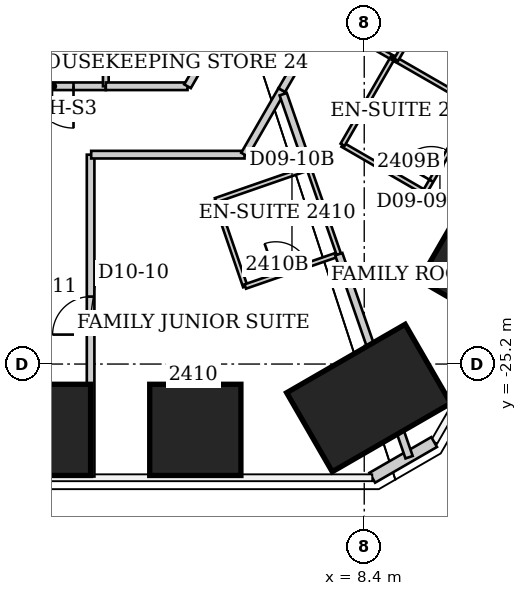
"""IFC4 building model, lengths in metres.
Left out: names, types, materials, properties, quantities, classifications, styles, units other than length and angle.
Written with IfcOpenShell. Run it as: python <this file> out.ifc"""

import sys

from ifc_helpers import new_model, si_unit, direction, frame, frame_2d, origin, origin_2d, place, context, subcontext, project, spatial, rectangle, extrude, element, fill, save


model = new_model("IFC4")
c1 = context("Model", 3, precision=1e-05, world=origin(), true_north=direction((0.0, 1.0)))
c2 = subcontext(c1, "Body", "Model", "MODEL_VIEW")
j1 = project(units=[si_unit("LENGTHUNIT", "METRE"), si_unit("PLANEANGLEUNIT", "RADIAN")], contexts=[c1])
p1 = place(None, origin())
s1 = spatial("IfcSite", under=j1, at=p1, CompositionType="ELEMENT")
p2 = place(p1, origin())
s2 = spatial("IfcBuilding", under=s1, at=p2, CompositionType="ELEMENT")
p3 = place(p2, frame((0.0, 0.0, 100.6)))
s3 = spatial("IfcBuildingStorey", under=s2, at=p3, CompositionType="ELEMENT", Elevation=100.6)
p4 = place(p3, frame((11.494, -22.559, 0.0), z_axis=(0.0, 0.0, 1.0), x_axis=(0.866025403784, -0.5, 0.0)))
e1 = element("IfcColumn", 1, at=p4, inside=s3, PredefinedType="COLUMN", context=c2, shape_type="SweptSolid", body=[
    extrude(rectangle(XDim=2.4, YDim=2.4, at=origin_2d()), origin(), (0.0, 0.0, 1.0), 3.8),
])
p5 = place(p3, frame((8.518, -26.094, 0.0), z_axis=(0.0, 0.0, 1.0), x_axis=(0.5, -0.866025403784, 0.0)))
e2 = element("IfcColumn", 2, at=p5, inside=s3, PredefinedType="COLUMN", context=c2, shape_type="SweptSolid", body=[
    extrude(rectangle(XDim=2.4, YDim=3.6, at=origin_2d()), origin(), (0.0, 0.0, 1.0), 3.8),
])
for number, where, z_axis, x_axis in (
    (3, (3.955, -26.932, 0.0), (0.0, 0.0, 1.0), (0.0, -1.0, 0.0)),
    (4, (0.0, -26.932, 0.0), (0.0, 0.0, 1.0), (0.0, -1.0, 0.0)),
):
    element("IfcColumn", number, at=place(p3, frame(where, z_axis=z_axis, x_axis=x_axis)), inside=s3, PredefinedType="COLUMN", context=c2, shape_type="SweptSolid", body=[
        extrude(rectangle(XDim=2.4, YDim=2.4, at=origin_2d()), origin(), (0.0, 0.0, 1.0), 3.8),
    ])
p6 = place(p3, frame((10.24, -27.252, 0.0), z_axis=(0.0, 0.0, 1.0), x_axis=(-0.866045024864, -0.499966013754, 0.0)))
e5 = element("IfcWall", 5, at=p6, inside=s3, PredefinedType="SOLIDWALL", context=c2, shape_type="SweptSolid", body=[
    extrude(rectangle(XDim=1.88, YDim=0.3, at=frame_2d((0.94, 0.0))), origin(), (0.0, 0.0, 1.0), 3.64),
])
p7 = place(p3, frame((1.2, -28.16, 0.0), z_axis=(0.0, 0.0, 1.0), x_axis=(0.0, 1.0, 0.0)))
e6 = element("IfcWall", 6, at=p7, inside=s3, PredefinedType="PARTITIONING", context=c2, shape_type="SweptSolid", body=[
    extrude(rectangle(XDim=8.47, YDim=0.2, at=frame_2d((4.235, 0.0))), origin(), (0.0, 0.0, 1.0), 3.64),
])
p8 = place(p7, frame((3.735, 0.0, 0.0)))
e7 = element("IfcOpeningElement", 7, at=p8, cuts=e6, PredefinedType="OPENING", context=c2, shape_type="SweptSolid", body=[
    extrude(rectangle(XDim=1.0, YDim=2.13, at=frame_2d((0.5, 1.065))), frame((0.0, 0.1, 0.0), z_axis=(0.0, -1.0, 0.0), x_axis=(1.0, 0.0, 0.0)), (0.0, 0.0, 1.0), 0.2),
])
p9 = place(p3, frame((1.215, -19.69, 0.0), z_axis=(0.0, 0.0, 1.0), x_axis=(1.0, 0.0, 0.0)))
e8 = element("IfcWall", 8, at=p9, inside=s3, PredefinedType="PARTITIONING", context=c2, shape_type="SweptSolid", body=[
    extrude(rectangle(XDim=4.035, YDim=0.2, at=frame_2d((2.018, 0.0))), origin(), (0.0, 0.0, 1.0), 3.64),
])
p10 = place(p3, frame((1.6, -17.89, 0.0), z_axis=(0.0, 0.0, 1.0), x_axis=(-1.0, 0.0, 0.0)))
e9 = element("IfcWall", 9, at=p10, inside=s3, PredefinedType="PARTITIONING", context=c2, shape_type="SweptSolid", body=[
    extrude(rectangle(XDim=2.8, YDim=0.2, at=frame_2d((1.4, 0.0))), origin(), (0.0, 0.0, 1.0), 3.64),
])
p11 = place(p10, frame((0.85, 0.0, 0.0)))
e10 = element("IfcOpeningElement", 10, at=p11, cuts=e9, PredefinedType="OPENING", context=c2, shape_type="SweptSolid", body=[
    extrude(rectangle(XDim=1.1, YDim=2.2, at=frame_2d((0.55, 1.1))), frame((0.0, 0.1, 0.0), z_axis=(0.0, -1.0, 0.0), x_axis=(1.0, 0.0, 0.0)), (0.0, 0.0, 1.0), 0.2),
])
p12 = place(p3, frame((1.6, -13.8, 0.0), z_axis=(0.0, 0.0, 1.0), x_axis=(0.0, -1.0, 0.0)))
e11 = element("IfcWall", 11, at=p12, inside=s3, PredefinedType="PARTITIONING", context=c2, shape_type="SweptSolid", body=[
    extrude(rectangle(XDim=4.09, YDim=0.15, at=frame_2d((2.045, 0.0))), origin(), (0.0, 0.0, 1.0), 3.64),
])
p13 = place(p3, frame((3.75, -17.89, 0.0), z_axis=(0.0, 0.0, 1.0), x_axis=(-1.0, 0.0, 0.0)))
e12 = element("IfcWall", 12, at=p13, inside=s3, PredefinedType="PARTITIONING", context=c2, shape_type="SweptSolid", body=[
    extrude(rectangle(XDim=2.15, YDim=0.2, at=frame_2d((1.075, 0.0))), origin(), (0.0, 0.0, 1.0), 3.64),
])
p14 = place(p3, frame((4.49, -20.89, 0.0), z_axis=(0.0, 0.0, 1.0), x_axis=(0.324971746724, -0.945723724896, 0.0)))
e13 = element("IfcWall", 13, at=p14, inside=s3, PredefinedType="PARTITIONING", context=c2, shape_type="SweptSolid", body=[
    extrude(rectangle(XDim=2.4, YDim=0.12, at=frame_2d((1.2, 0.0))), origin(), (0.0, 0.0, 1.0), 3.64),
])
p15 = place(p3, frame((5.25, -19.69, 0.0), z_axis=(0.0, 0.0, 1.0), x_axis=(0.499431599995, 0.866353321068, 0.0)))
e14 = element("IfcWall", 14, at=p15, inside=s3, PredefinedType="PARTITIONING", context=c2, shape_type="SweptSolid", body=[
    extrude(rectangle(XDim=1.962, YDim=0.2, at=frame_2d((0.981, 0.0))), origin(), (0.0, 0.0, 1.0), 3.64),
])
p16 = place(p3, frame((5.27, -23.16, 0.0), z_axis=(0.0, 0.0, 1.0), x_axis=(0.945184415197, 0.326537013627, 0.0)))
e15 = element("IfcWall", 15, at=p16, inside=s3, PredefinedType="PARTITIONING", context=c2, shape_type="SweptSolid", body=[
    extrude(rectangle(XDim=2.603, YDim=0.12, at=frame_2d((1.301, 0.0))), origin(), (0.0, 0.0, 1.0), 3.64),
])
p17 = place(p16, frame((0.85, 0.0, 0.0)))
e16 = element("IfcOpeningElement", 16, at=p17, cuts=e15, PredefinedType="OPENING", context=c2, shape_type="SweptSolid", body=[
    extrude(rectangle(XDim=0.9, YDim=2.03, at=frame_2d((0.45, 1.015))), frame((0.0, 0.06, 0.0), z_axis=(0.0, -1.0, 0.0), x_axis=(1.0, 0.0, 0.0)), (0.0, 0.0, 1.0), 0.12),
])
p18 = place(p3, frame((6.083, -13.85, 0.0), z_axis=(0.0, 0.0, 1.0), x_axis=(-0.499977643516, -0.866038310922, 0.0)))
e17 = element("IfcWall", 17, at=p18, inside=s3, PredefinedType="PARTITIONING", context=c2, shape_type="SweptSolid", body=[
    extrude(rectangle(XDim=4.665, YDim=0.2, at=frame_2d((2.333, 0.0))), origin(), (0.0, 0.0, 1.0), 3.64),
])
p19 = place(p3, frame((6.23, -17.99, 0.0), z_axis=(0.0, 0.0, 1.0), x_axis=(0.501088872721, 0.865395829453, 0.0)))
e18 = element("IfcWall", 18, at=p19, inside=s3, PredefinedType="PARTITIONING", context=c2, shape_type="SweptSolid", body=[
    extrude(rectangle(XDim=2.195, YDim=0.2, at=frame_2d((1.098, 0.0))), origin(), (0.0, 0.0, 1.0), 3.64),
])
p20 = place(p19, frame((0.598, 0.0, 0.0)))
e19 = element("IfcOpeningElement", 19, at=p20, cuts=e18, PredefinedType="OPENING", context=c2, shape_type="SweptSolid", body=[
    extrude(rectangle(XDim=1.0, YDim=2.13, at=frame_2d((0.5, 1.065))), frame((0.0, 0.1, 0.0), z_axis=(0.0, -1.0, 0.0), x_axis=(1.0, 0.0, 0.0)), (0.0, 0.0, 1.0), 0.2),
])
p21 = place(p3, frame((6.268, -18.099, 0.0), z_axis=(0.0, 0.0, 1.0), x_axis=(0.327257488288, -0.944935202202, 0.0)))
e20 = element("IfcWall", 20, at=p21, inside=s3, PredefinedType="PARTITIONING", context=c2, shape_type="SweptSolid", body=[
    extrude(rectangle(XDim=2.054, YDim=0.2, at=frame_2d((1.027, 0.0))), origin(), (0.0, 0.0, 1.0), 3.64),
])
p22 = place(p3, frame((6.94, -20.04, 0.0), z_axis=(0.0, 0.0, 1.0), x_axis=(-0.944772080486, -0.327728112822, 0.0)))
e21 = element("IfcWall", 21, at=p22, inside=s3, PredefinedType="PARTITIONING", context=c2, shape_type="SweptSolid", body=[
    extrude(rectangle(XDim=2.593, YDim=0.12, at=frame_2d((1.297, 0.0))), origin(), (0.0, 0.0, 1.0), 3.64),
])
p23 = place(p3, frame((6.94, -20.04, 0.0), z_axis=(0.0, 0.0, 1.0), x_axis=(0.328693963496, -0.944436487203, 0.0)))
e22 = element("IfcWall", 22, at=p23, inside=s3, PredefinedType="PARTITIONING", context=c2, shape_type="SweptSolid", body=[
    extrude(rectangle(XDim=2.404, YDim=0.12, at=frame_2d((1.202, 0.0))), origin(), (0.0, 0.0, 1.0), 3.64),
])
p24 = place(p3, frame((7.33, -16.09, 0.0), z_axis=(0.0, 0.0, 1.0), x_axis=(0.86618365172, -0.499725806311, 0.0)))
e23 = element("IfcWall", 23, at=p24, inside=s3, PredefinedType="PARTITIONING", context=c2, shape_type="SweptSolid", body=[
    extrude(rectangle(XDim=2.101, YDim=0.12, at=frame_2d((1.051, 0.0))), origin(), (0.0, 0.0, 1.0), 3.64),
])
p25 = place(p3, frame((7.73, -22.31, 0.0), z_axis=(0.0, 0.0, 1.0), x_axis=(0.327284111977, -0.944925981253, 0.0)))
e24 = element("IfcWall", 24, at=p25, inside=s3, PredefinedType="PARTITIONING", context=c2, shape_type="SweptSolid", body=[
    extrude(rectangle(XDim=5.653, YDim=0.2, at=frame_2d((2.826, 0.0))), origin(), (0.0, 0.0, 1.0), 3.64),
])
p26 = place(p3, frame((7.83, -19.43, 0.0), z_axis=(0.0, 0.0, 1.0), x_axis=(0.865508881864, -0.500893576935, 0.0)))
e25 = element("IfcWall", 25, at=p26, inside=s3, PredefinedType="PARTITIONING", context=c2, shape_type="SweptSolid", body=[
    extrude(rectangle(XDim=2.496, YDim=0.12, at=frame_2d((1.248, 0.0))), origin(), (0.0, 0.0, 1.0), 3.64),
])
p27 = place(p3, frame((9.15, -17.14, 0.0), z_axis=(0.0, 0.0, 1.0), x_axis=(-0.499338582192, -0.866406936915, 0.0)))
e26 = element("IfcWall", 26, at=p27, inside=s3, PredefinedType="PARTITIONING", context=c2, shape_type="SweptSolid", body=[
    extrude(rectangle(XDim=2.643, YDim=0.12, at=frame_2d((1.322, 0.0))), origin(), (0.0, 0.0, 1.0), 3.64),
])
p28 = place(p3, frame((9.15, -17.14, 0.0), z_axis=(0.0, 0.0, 1.0), x_axis=(0.867366768559, -0.49766945737, 0.0)))
e27 = element("IfcWall", 27, at=p28, inside=s3, PredefinedType="PARTITIONING", context=c2, shape_type="SweptSolid", body=[
    extrude(rectangle(XDim=0.103, YDim=0.12, at=frame_2d((0.052, 0.0))), origin(), (0.0, 0.0, 1.0), 3.64),
])
p29 = place(p3, frame((9.239, -17.191, 0.0), z_axis=(0.0, 0.0, 1.0), x_axis=(0.86649853798, -0.49917961064, 0.0)))
e28 = element("IfcWall", 28, at=p29, inside=s3, PredefinedType="PARTITIONING", context=c2, shape_type="SweptSolid", body=[
    extrude(rectangle(XDim=2.401, YDim=0.12, at=frame_2d((1.201, 0.0))), origin(), (0.0, 0.0, 1.0), 3.64),
])
p30 = place(p3, frame((9.24, -17.19, 0.0), z_axis=(0.0, 0.0, 1.0), x_axis=(0.501502765098, 0.865156041763, 0.0)))
e29 = element("IfcWall", 29, at=p30, inside=s3, PredefinedType="PARTITIONING", context=c2, shape_type="SweptSolid", body=[
    extrude(rectangle(XDim=2.393, YDim=0.12, at=frame_2d((1.196, 0.0))), origin(), (0.0, 0.0, 1.0), 3.64),
])
p31 = place(p30, frame((0.3, 0.0, 0.0)))
e30 = element("IfcOpeningElement", 30, at=p31, cuts=e29, PredefinedType="OPENING", context=c2, shape_type="SweptSolid", body=[
    extrude(rectangle(XDim=0.9, YDim=2.03, at=frame_2d((0.45, 1.015))), frame((0.0, 0.06, 0.0), z_axis=(0.0, -1.0, 0.0), x_axis=(1.0, 0.0, 0.0)), (0.0, 0.0, 1.0), 0.12),
])
p32 = place(p3, frame((9.99, -20.68, 0.0), z_axis=(0.0, 0.0, 1.0), x_axis=(0.502242265546, 0.864726954997, 0.0)))
e31 = element("IfcWall", 31, at=p32, inside=s3, PredefinedType="PARTITIONING", context=c2, shape_type="SweptSolid", body=[
    extrude(rectangle(XDim=2.648, YDim=0.12, at=frame_2d((1.324, 0.0))), origin(), (0.0, 0.0, 1.0), 3.64),
])
p33 = place(p32, frame((0.35, 0.0, 0.0)))
e32 = element("IfcOpeningElement", 32, at=p33, cuts=e31, PredefinedType="OPENING", context=c2, shape_type="SweptSolid", body=[
    extrude(rectangle(XDim=0.9, YDim=2.03, at=frame_2d((0.45, 1.015))), frame((0.0, 0.06, 0.0), z_axis=(0.0, -1.0, 0.0), x_axis=(1.0, 0.0, 0.0)), (0.0, 0.0, 1.0), 0.12),
])
p34 = place(p20, origin())
e33 = element("IfcDoor", 33, at=p34, inside=s3, OperationType="SINGLE_SWING_LEFT", PredefinedType="DOOR", context=c2, shape_type="SweptSolid", body=[
    extrude(rectangle(XDim=1.0, YDim=2.13, at=frame_2d((0.5, 1.065))), frame((0.0, 0.025, 0.0), z_axis=(0.0, -1.0, 0.0), x_axis=(1.0, 0.0, 0.0)), (0.0, 0.0, 1.0), 0.05),
])
fill(e19, e33)
p35 = place(p33, origin())
e34 = element("IfcDoor", 34, at=p35, inside=s3, OperationType="SINGLE_SWING_LEFT", PredefinedType="DOOR", context=c2, shape_type="SweptSolid", body=[
    extrude(rectangle(XDim=0.9, YDim=2.03, at=frame_2d((0.45, 1.015))), frame((0.0, 0.025, 0.0), z_axis=(0.0, -1.0, 0.0), x_axis=(1.0, 0.0, 0.0)), (0.0, 0.0, 1.0), 0.05),
])
fill(e32, e34)
p36 = place(p8, origin())
e35 = element("IfcDoor", 35, at=p36, inside=s3, OperationType="SINGLE_SWING_LEFT", PredefinedType="DOOR", context=c2, shape_type="SweptSolid", body=[
    extrude(rectangle(XDim=1.0, YDim=2.13, at=frame_2d((0.5, 1.065))), frame((0.0, 0.025, 0.0), z_axis=(0.0, -1.0, 0.0), x_axis=(1.0, 0.0, 0.0)), (0.0, 0.0, 1.0), 0.05),
])
fill(e7, e35)
p37 = place(p17, origin())
e36 = element("IfcDoor", 36, at=p37, inside=s3, OperationType="SINGLE_SWING_LEFT", PredefinedType="DOOR", context=c2, shape_type="SweptSolid", body=[
    extrude(rectangle(XDim=0.9, YDim=2.03, at=frame_2d((0.45, 1.015))), frame((0.0, 0.025, 0.0), z_axis=(0.0, -1.0, 0.0), x_axis=(1.0, 0.0, 0.0)), (0.0, 0.0, 1.0), 0.05),
])
fill(e16, e36)
p38 = place(p11, origin())
e37 = element("IfcDoor", 37, at=p38, inside=s3, OperationType="SINGLE_SWING_LEFT", PredefinedType="DOOR", context=c2, shape_type="SweptSolid", body=[
    extrude(rectangle(XDim=1.1, YDim=2.2, at=frame_2d((0.55, 1.1))), frame((0.0, 0.025, 0.0), z_axis=(0.0, -1.0, 0.0), x_axis=(1.0, 0.0, 0.0)), (0.0, 0.0, 1.0), 0.05),
])
fill(e10, e37)
save(model, sys.argv[1])
